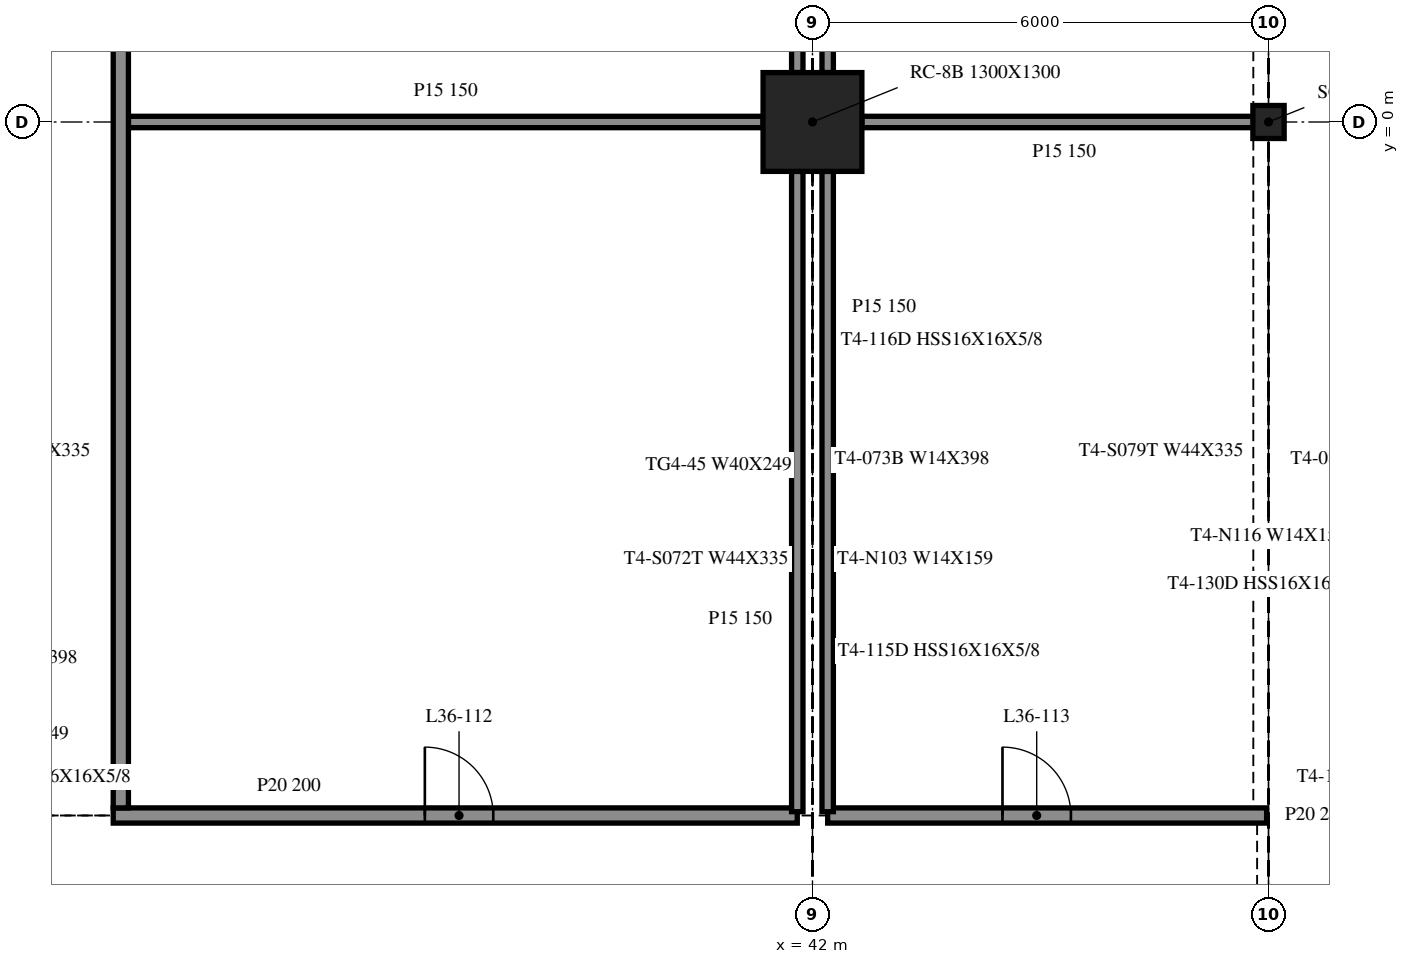
"""IFC4 building model, lengths in metres.
Left out: names, types, materials, properties, quantities, classifications, styles, units other than length and angle.
Written with IfcOpenShell. Run it as: python <this file> out.ifc"""

import sys

from ifc_helpers import new_model, si_unit, direction, frame, frame_2d, origin, origin_2d, place, context, subcontext, project, spatial, rectangle, i_section, extrude, element, fill, save


model = new_model("IFC4")
c1 = context("Model", 3, precision=1e-05, world=origin(), true_north=direction((0.0, 1.0)))
c2 = subcontext(c1, "Body", "Model", "MODEL_VIEW")
j1 = project(units=[si_unit("LENGTHUNIT", "METRE"), si_unit("PLANEANGLEUNIT", "RADIAN")], contexts=[c1])
p1 = place(None, origin())
s1 = spatial("IfcSite", under=j1, at=p1, CompositionType="ELEMENT")
p2 = place(p1, origin())
s2 = spatial("IfcBuilding", under=s1, at=p2, CompositionType="ELEMENT")
p3 = place(p2, frame((0.0, 0.0, 154.8)))
s3 = spatial("IfcBuildingStorey", under=s2, at=p3, CompositionType="ELEMENT", Elevation=154.8)
p4 = place(p3, frame((42.0, 0.0, -0.55), z_axis=(0.0, 0.0, 1.0), x_axis=(1.0, 0.0, 0.0)))
e1 = element("IfcColumn", 1, at=p4, inside=s3, PredefinedType="COLUMN", context=c2, shape_type="SweptSolid", body=[
    extrude(rectangle(XDim=1.3, YDim=1.3, at=origin_2d()), origin(), (0.0, 0.0, 1.0), 4.61),
])
p5 = place(p3, frame((48.0, 0.0, -0.55), z_axis=(0.0, 0.0, 1.0), x_axis=(1.0, 0.0, 0.0)))
e2 = element("IfcColumn", 2, at=p5, inside=s3, PredefinedType="COLUMN", context=c2, shape_type="SweptSolid", body=[
    extrude(i_section(OverallWidth=0.412, OverallDepth=0.434, WebThickness=0.036, FlangeThickness=0.057, at=origin_2d()), origin(), (0.0, 0.0, 1.0), 4.61),
])
p6 = place(p3, frame((32.8, -9.125, 0.0), z_axis=(0.0, 0.0, 1.0), x_axis=(1.0, 0.0, 0.0)))
e3 = element("IfcWall", 3, at=p6, inside=s3, PredefinedType="PARTITIONING", context=c2, shape_type="SweptSolid", body=[
    extrude(rectangle(XDim=9.0, YDim=0.2, at=frame_2d((4.5, 0.0))), origin(), (0.0, 0.0, 1.0), 4.06),
])
p7 = place(p6, frame((4.1, 0.0, 0.0)))
e4 = element("IfcOpeningElement", 4, at=p7, cuts=e3, PredefinedType="OPENING", context=c2, shape_type="SweptSolid", body=[
    extrude(rectangle(XDim=0.9, YDim=2.1, at=frame_2d((0.45, 1.05))), frame((0.0, 0.11, 0.0), z_axis=(0.0, -1.0, 0.0), x_axis=(1.0, 0.0, 0.0)), (0.0, 0.0, 1.0), 0.22),
])
p8 = place(p3, frame((42.2, -9.125, 0.0), z_axis=(0.0, 0.0, 1.0), x_axis=(1.0, 0.0, 0.0)))
e5 = element("IfcWall", 5, at=p8, inside=s3, PredefinedType="PARTITIONING", context=c2, shape_type="SweptSolid", body=[
    extrude(rectangle(XDim=5.775, YDim=0.2, at=frame_2d((2.888, 0.0))), origin(), (0.0, 0.0, 1.0), 4.06),
])
p9 = place(p8, frame((2.3, 0.0, 0.0)))
e6 = element("IfcOpeningElement", 6, at=p9, cuts=e5, PredefinedType="OPENING", context=c2, shape_type="SweptSolid", body=[
    extrude(rectangle(XDim=0.9, YDim=2.1, at=frame_2d((0.45, 1.05))), frame((0.0, 0.11, 0.0), z_axis=(0.0, -1.0, 0.0), x_axis=(1.0, 0.0, 0.0)), (0.0, 0.0, 1.0), 0.22),
])
p10 = place(p3, frame((33.0, 0.0, 0.0), z_axis=(0.0, 0.0, 1.0), x_axis=(1.0, 0.0, 0.0)))
e7 = element("IfcWall", 7, at=p10, inside=s3, PredefinedType="PARTITIONING", context=c2, shape_type="SweptSolid", body=[
    extrude(rectangle(XDim=8.35, YDim=0.15, at=frame_2d((4.175, 0.0))), origin(), (0.0, 0.0, 1.0), 4.06),
])
p11 = place(p3, frame((42.65, 0.0, 0.0), z_axis=(0.0, 0.0, 1.0), x_axis=(1.0, 0.0, 0.0)))
e8 = element("IfcWall", 8, at=p11, inside=s3, PredefinedType="PARTITIONING", context=c2, shape_type="SweptSolid", body=[
    extrude(rectangle(XDim=5.325, YDim=0.15, at=frame_2d((2.663, 0.0))), origin(), (0.0, 0.0, 1.0), 4.06),
])
p12 = place(p3, frame((32.9, -9.025, 0.0), z_axis=(0.0, 0.0, 1.0), x_axis=(0.0, 1.0, 0.0)))
e9 = element("IfcWall", 9, at=p12, inside=s3, PredefinedType="PARTITIONING", context=c2, shape_type="SweptSolid", body=[
    extrude(rectangle(XDim=24.05, YDim=0.2, at=frame_2d((12.025, 0.0))), origin(), (0.0, 0.0, 1.0), 4.06),
])
p13 = place(p3, frame((41.8, -9.075, 0.0), z_axis=(0.0, 0.0, 1.0), x_axis=(0.0, 1.0, 0.0)))
e10 = element("IfcWall", 10, at=p13, inside=s3, PredefinedType="PARTITIONING", context=c2, shape_type="SweptSolid", body=[
    extrude(rectangle(XDim=8.425, YDim=0.15, at=frame_2d((4.212, 0.0))), origin(), (0.0, 0.0, 1.0), 4.06),
])
p14 = place(p3, frame((41.8, 0.65, 0.0), z_axis=(0.0, 0.0, 1.0), x_axis=(0.0, 1.0, 0.0)))
e11 = element("IfcWall", 11, at=p14, inside=s3, PredefinedType="PARTITIONING", context=c2, shape_type="SweptSolid", body=[
    extrude(rectangle(XDim=10.2, YDim=0.15, at=frame_2d((5.1, 0.0))), origin(), (0.0, 0.0, 1.0), 4.06),
])
p15 = place(p3, frame((42.2, -9.075, 0.0), z_axis=(0.0, 0.0, 1.0), x_axis=(0.0, 1.0, 0.0)))
e12 = element("IfcWall", 12, at=p15, inside=s3, PredefinedType="PARTITIONING", context=c2, shape_type="SweptSolid", body=[
    extrude(rectangle(XDim=8.425, YDim=0.15, at=frame_2d((4.212, 0.0))), origin(), (0.0, 0.0, 1.0), 4.06),
])
p16 = place(p3, frame((42.2, 0.65, 0.0), z_axis=(0.0, 0.0, 1.0), x_axis=(0.0, 1.0, 0.0)))
e13 = element("IfcWall", 13, at=p16, inside=s3, PredefinedType="PARTITIONING", context=c2, shape_type="SweptSolid", body=[
    extrude(rectangle(XDim=10.2, YDim=0.15, at=frame_2d((5.1, 0.0))), origin(), (0.0, 0.0, 1.0), 4.06),
])
p17 = place(p7, origin())
e14 = element("IfcDoor", 14, at=p17, inside=s3, OperationType="SINGLE_SWING_RIGHT", PredefinedType="DOOR", context=c2, shape_type="SweptSolid", body=[
    extrude(rectangle(XDim=0.9, YDim=2.1, at=frame_2d((0.45, 1.05))), frame((0.0, 0.025, 0.0), z_axis=(0.0, -1.0, 0.0), x_axis=(1.0, 0.0, 0.0)), (0.0, 0.0, 1.0), 0.05),
])
fill(e4, e14)
p18 = place(p9, origin())
e15 = element("IfcDoor", 15, at=p18, inside=s3, OperationType="SINGLE_SWING_LEFT", PredefinedType="DOOR", context=c2, shape_type="SweptSolid", body=[
    extrude(rectangle(XDim=0.9, YDim=2.1, at=frame_2d((0.45, 1.05))), frame((0.0, 0.025, 0.0), z_axis=(0.0, -1.0, 0.0), x_axis=(1.0, 0.0, 0.0)), (0.0, 0.0, 1.0), 0.05),
])
fill(e6, e15)
save(model, sys.argv[1])
